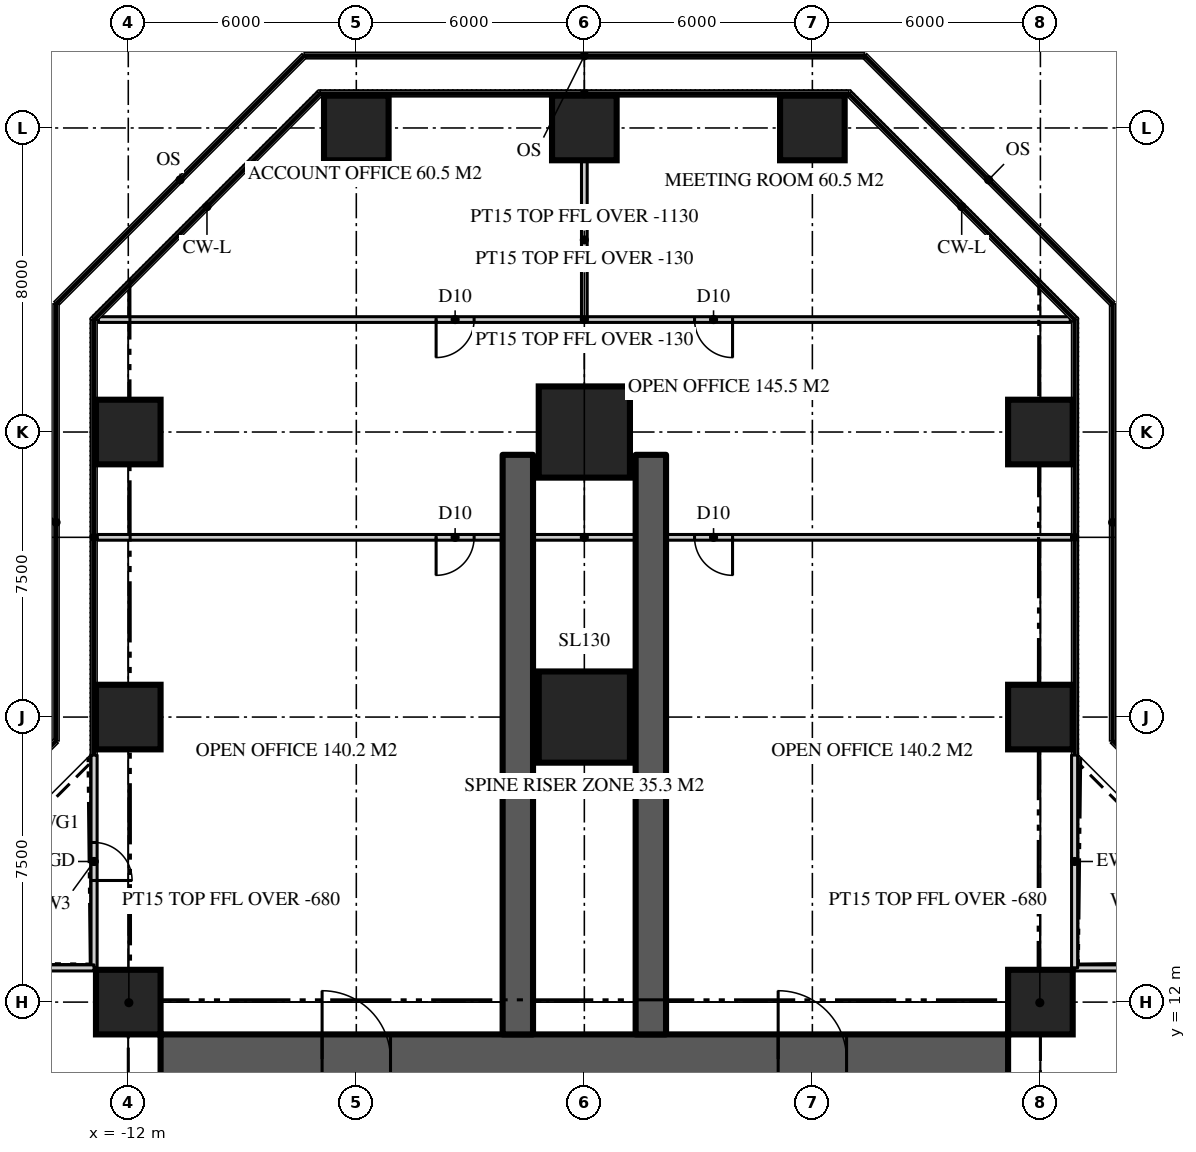
"""IFC4 building model, lengths in metres.
Left out: names, types, materials, properties, quantities, classifications, styles, units other than length and angle.
Written with IfcOpenShell. Run it as: python <this file> out.ifc"""

import sys

from ifc_helpers import new_model, si_unit, direction, frame, frame_2d, origin, origin_2d, place, context, subcontext, project, spatial, rectangle, extrude, element, fill, save


model = new_model("IFC4")
c1 = context("Model", 3, precision=1e-05, world=origin(), true_north=direction((0.0, 1.0)))
c2 = subcontext(c1, "Body", "Model", "MODEL_VIEW")
j1 = project(units=[si_unit("LENGTHUNIT", "METRE"), si_unit("PLANEANGLEUNIT", "RADIAN")], contexts=[c1])
p1 = place(None, origin())
s1 = spatial("IfcSite", under=j1, at=p1, CompositionType="ELEMENT")
p2 = place(p1, origin())
s2 = spatial("IfcBuilding", under=s1, at=p2, CompositionType="ELEMENT")
p3 = place(p2, frame((0.0, 0.0, 94.2)))
s3 = spatial("IfcBuildingStorey", under=s2, at=p3, CompositionType="ELEMENT", Elevation=94.2)
p4 = place(p3, frame((-11.15, 10.5, 0.0), z_axis=(0.0, 0.0, 1.0), x_axis=(1.0, 0.0, 0.0)))
e1 = element("IfcWall", 1, at=p4, inside=s3, PredefinedType="SHEAR", context=c2, shape_type="SweptSolid", body=[
    extrude(rectangle(XDim=22.3, YDim=1.3, at=frame_2d((11.15, 0.0))), origin(), (0.0, 0.0, 1.0), 3.9),
])
p5 = place(p4, frame((4.25, 0.0, 0.0)))
e2 = element("IfcOpeningElement", 2, at=p5, cuts=e1, PredefinedType="OPENING", context=c2, shape_type="SweptSolid", body=[
    extrude(rectangle(XDim=1.8, YDim=2.2, at=frame_2d((0.9, 1.1))), frame((0.0, 0.66, 0.0), z_axis=(0.0, -1.0, 0.0), x_axis=(1.0, 0.0, 0.0)), (0.0, 0.0, 1.0), 1.32),
])
p6 = place(p4, frame((16.25, 0.0, 0.0)))
e3 = element("IfcOpeningElement", 3, at=p6, cuts=e1, PredefinedType="OPENING", context=c2, shape_type="SweptSolid", body=[
    extrude(rectangle(XDim=1.8, YDim=2.2, at=frame_2d((0.9, 1.1))), frame((0.0, 0.66, 0.0), z_axis=(0.0, -1.0, 0.0), x_axis=(1.0, 0.0, 0.0)), (0.0, 0.0, 1.0), 1.32),
])
for number, where, z_axis, x_axis in (
    (4, (1.75, 11.15, 0.0), (0.0, 0.0, 1.0), (0.0, 1.0, 0.0)),
    (5, (-1.75, 11.15, 0.0), (0.0, 0.0, 1.0), (0.0, 1.0, 0.0)),
):
    element("IfcWall", number, at=place(p3, frame(where, z_axis=z_axis, x_axis=x_axis)), inside=s3, PredefinedType="SHEAR", context=c2, shape_type="SweptSolid", body=[
        extrude(rectangle(XDim=15.25, YDim=0.8, at=frame_2d((7.625, 0.0))), origin(), (0.0, 0.0, 1.0), 3.9),
    ])
for number, where, z_axis, x_axis in (
    (6, (-12.0, 12.0, 0.0), (0.0, 0.0, 1.0), (1.0, 0.0, 0.0)),
    (7, (12.0, 12.0, 0.0), (0.0, 0.0, 1.0), (1.0, 0.0, 0.0)),
    (8, (-12.0, 19.5, 0.0), (0.0, 0.0, 1.0), (1.0, 0.0, 0.0)),
):
    element("IfcColumn", number, at=place(p3, frame(where, z_axis=z_axis, x_axis=x_axis)), inside=s3, PredefinedType="COLUMN", context=c2, shape_type="SweptSolid", body=[
        extrude(rectangle(XDim=1.7, YDim=1.7, at=origin_2d()), origin(), (0.0, 0.0, 1.0), 3.9),
    ])
p7 = place(p3, frame((0.0, 19.5, 0.0), z_axis=(0.0, 0.0, 1.0), x_axis=(1.0, 0.0, 0.0)))
e9 = element("IfcColumn", 9, at=p7, inside=s3, PredefinedType="COLUMN", context=c2, shape_type="SweptSolid", body=[
    extrude(rectangle(XDim=2.4, YDim=2.4, at=origin_2d()), origin(), (0.0, 0.0, 1.0), 3.9),
])
for number, where, z_axis, x_axis in (
    (10, (12.0, 19.5, 0.0), (0.0, 0.0, 1.0), (1.0, 0.0, 0.0)),
    (11, (-12.0, 27.0, 0.0), (0.0, 0.0, 1.0), (1.0, 0.0, 0.0)),
):
    element("IfcColumn", number, at=place(p3, frame(where, z_axis=z_axis, x_axis=x_axis)), inside=s3, PredefinedType="COLUMN", context=c2, shape_type="SweptSolid", body=[
        extrude(rectangle(XDim=1.7, YDim=1.7, at=origin_2d()), origin(), (0.0, 0.0, 1.0), 3.9),
    ])
p8 = place(p3, frame((0.0, 27.0, 0.0), z_axis=(0.0, 0.0, 1.0), x_axis=(1.0, 0.0, 0.0)))
e12 = element("IfcColumn", 12, at=p8, inside=s3, PredefinedType="COLUMN", context=c2, shape_type="SweptSolid", body=[
    extrude(rectangle(XDim=2.4, YDim=2.4, at=origin_2d()), origin(), (0.0, 0.0, 1.0), 3.9),
])
for number, where, z_axis, x_axis in (
    (13, (12.0, 27.0, 0.0), (0.0, 0.0, 1.0), (1.0, 0.0, 0.0)),
    (14, (-6.0, 35.0, 0.0), (0.0, 0.0, 1.0), (1.0, 0.0, 0.0)),
    (15, (0.0, 35.0, 0.0), (0.0, 0.0, 1.0), (1.0, 0.0, 0.0)),
    (16, (6.0, 35.0, 0.0), (0.0, 0.0, 1.0), (1.0, 0.0, 0.0)),
):
    element("IfcColumn", number, at=place(p3, frame(where, z_axis=z_axis, x_axis=x_axis)), inside=s3, PredefinedType="COLUMN", context=c2, shape_type="SweptSolid", body=[
        extrude(rectangle(XDim=1.7, YDim=1.7, at=origin_2d()), origin(), (0.0, 0.0, 1.0), 3.9),
    ])
p9 = place(p3, frame((18.5, 12.9, 0.0), z_axis=(0.0, 0.0, 1.0), x_axis=(-1.0, 0.0, 0.0)))
e17 = element("IfcWall", 17, at=p9, inside=s3, PredefinedType="SOLIDWALL", context=c2, shape_type="SweptSolid", body=[
    extrude(rectangle(XDim=5.6, YDim=0.16, at=frame_2d((2.8, 0.0))), origin(), (0.0, 0.0, 1.0), 3.77),
])
p10 = place(p9, frame((2.3, 0.0, 0.0)))
e18 = element("IfcOpeningElement", 18, at=p10, cuts=e17, PredefinedType="OPENING", context=c2, shape_type="SweptSolid", body=[
    extrude(rectangle(XDim=1.0, YDim=2.2, at=frame_2d((0.5, 1.1))), frame((0.0, 0.09, 0.0), z_axis=(0.0, -1.0, 0.0), x_axis=(1.0, 0.0, 0.0)), (0.0, 0.0, 1.0), 0.18),
])
p11 = place(p3, frame((12.9, 12.9, 0.0), z_axis=(0.0, 0.0, 1.0), x_axis=(0.0, 1.0, 0.0)))
e19 = element("IfcWall", 19, at=p11, inside=s3, PredefinedType="SOLIDWALL", context=c2, shape_type="SweptSolid", body=[
    extrude(rectangle(XDim=5.6, YDim=0.16, at=frame_2d((2.8, 0.0))), origin(), (0.0, 0.0, 1.0), 3.77),
])
p12 = place(p3, frame((-12.9, 18.5, 0.0), z_axis=(0.0, 0.0, 1.0), x_axis=(0.0, -1.0, 0.0)))
e20 = element("IfcWall", 20, at=p12, inside=s3, PredefinedType="SOLIDWALL", context=c2, shape_type="SweptSolid", body=[
    extrude(rectangle(XDim=5.6, YDim=0.16, at=frame_2d((2.8, 0.0))), origin(), (0.0, 0.0, 1.0), 3.77),
])
p13 = place(p12, frame((2.3, 0.0, 0.0)))
e21 = element("IfcOpeningElement", 21, at=p13, cuts=e20, PredefinedType="OPENING", context=c2, shape_type="SweptSolid", body=[
    extrude(rectangle(XDim=1.0, YDim=2.2, at=frame_2d((0.5, 1.1))), frame((0.0, 0.09, 0.0), z_axis=(0.0, -1.0, 0.0), x_axis=(1.0, 0.0, 0.0)), (0.0, 0.0, 1.0), 0.18),
])
p14 = place(p3, frame((-12.9, 12.9, 0.0), z_axis=(0.0, 0.0, 1.0), x_axis=(-1.0, 0.0, 0.0)))
e22 = element("IfcWall", 22, at=p14, inside=s3, PredefinedType="SOLIDWALL", context=c2, shape_type="SweptSolid", body=[
    extrude(rectangle(XDim=5.6, YDim=0.16, at=frame_2d((2.8, 0.0))), origin(), (0.0, 0.0, 1.0), 3.77),
])
p15 = place(p3, frame((12.82, 24.229, 0.0), z_axis=(0.0, 0.0, 1.0), x_axis=(-1.0, 0.0, 0.0)))
e23 = element("IfcWall", 23, at=p15, inside=s3, PredefinedType="PARTITIONING", context=c2, shape_type="SweptSolid", body=[
    extrude(rectangle(XDim=25.64, YDim=0.15, at=frame_2d((12.82, 0.0))), origin(), (0.0, 0.0, 1.0), 3.77),
])
p16 = place(p15, frame((15.72, 0.0, 0.0)))
e24 = element("IfcOpeningElement", 24, at=p16, cuts=e23, PredefinedType="OPENING", context=c2, shape_type="SweptSolid", body=[
    extrude(rectangle(XDim=1.0, YDim=2.2, at=frame_2d((0.5, 1.1))), frame((0.0, 0.085, 0.0), z_axis=(0.0, -1.0, 0.0), x_axis=(1.0, 0.0, 0.0)), (0.0, 0.0, 1.0), 0.17),
])
p17 = place(p15, frame((8.92, 0.0, 0.0)))
e25 = element("IfcOpeningElement", 25, at=p17, cuts=e23, PredefinedType="OPENING", context=c2, shape_type="SweptSolid", body=[
    extrude(rectangle(XDim=1.0, YDim=2.2, at=frame_2d((0.5, 1.1))), frame((0.0, 0.085, 0.0), z_axis=(0.0, -1.0, 0.0), x_axis=(1.0, 0.0, 0.0)), (0.0, 0.0, 1.0), 0.17),
])
p18 = place(p3, frame((12.786, 29.959, 0.0), z_axis=(0.0, 0.0, 1.0), x_axis=(-1.0, 0.0, 0.0)))
e26 = element("IfcWall", 26, at=p18, inside=s3, PredefinedType="PARTITIONING", context=c2, shape_type="SweptSolid", body=[
    extrude(rectangle(XDim=25.573, YDim=0.15, at=frame_2d((12.786, 0.0))), origin(), (0.0, 0.0, 1.0), 3.77),
])
p19 = place(p18, frame((15.687, 0.0, 0.0)))
e27 = element("IfcOpeningElement", 27, at=p19, cuts=e26, PredefinedType="OPENING", context=c2, shape_type="SweptSolid", body=[
    extrude(rectangle(XDim=1.0, YDim=2.2, at=frame_2d((0.5, 1.1))), frame((0.0, 0.085, 0.0), z_axis=(0.0, -1.0, 0.0), x_axis=(1.0, 0.0, 0.0)), (0.0, 0.0, 1.0), 0.17),
])
p20 = place(p18, frame((8.886, 0.0, 0.0)))
e28 = element("IfcOpeningElement", 28, at=p20, cuts=e26, PredefinedType="OPENING", context=c2, shape_type="SweptSolid", body=[
    extrude(rectangle(XDim=1.0, YDim=2.2, at=frame_2d((0.5, 1.1))), frame((0.0, 0.085, 0.0), z_axis=(0.0, -1.0, 0.0), x_axis=(1.0, 0.0, 0.0)), (0.0, 0.0, 1.0), 0.17),
])
p21 = place(p3, frame((0.0, 29.959, 0.0), z_axis=(0.0, 0.0, 1.0), x_axis=(0.0, 1.0, 0.0)))
e29 = element("IfcWall", 29, at=p21, inside=s3, PredefinedType="PARTITIONING", context=c2, shape_type="SweptSolid", body=[
    extrude(rectangle(XDim=4.191, YDim=0.15, at=frame_2d((2.095, 0.0))), origin(), (0.0, 0.0, 1.0), 2.77),
])
for number, where, z_axis, x_axis in (
    (30, (11.15, 11.15, 0.0), (0.0, 0.0, 1.0), (0.707, 0.707, 0.0)),
    (31, (-11.15, 11.15, 0.0), (0.0, 0.0, 1.0), (-0.707, 0.707, 0.0)),
):
    element("IfcWall", number, at=place(p3, frame(where, z_axis=z_axis, x_axis=x_axis)), inside=s3, PredefinedType="PARTITIONING", context=c2, shape_type="SweptSolid", body=[
        extrude(rectangle(XDim=2.362, YDim=0.15, at=frame_2d((1.181, 0.0))), origin(), (0.0, 0.0, 1.0), 3.22),
    ])
p22 = place(p13, origin())
e32 = element("IfcDoor", 32, at=p22, inside=s3, OperationType="SINGLE_SWING_RIGHT", PredefinedType="DOOR", context=c2, shape_type="SweptSolid", body=[
    extrude(rectangle(XDim=1.0, YDim=2.2, at=frame_2d((0.5, 1.1))), frame((0.0, 0.025, 0.0), z_axis=(0.0, -1.0, 0.0), x_axis=(1.0, 0.0, 0.0)), (0.0, 0.0, 1.0), 0.05),
])
fill(e21, e32)
p23 = place(p5, origin())
e33 = element("IfcDoor", 33, at=p23, inside=s3, OperationType="DOUBLE_DOOR_DOUBLE_SWING", PredefinedType="DOOR", context=c2, shape_type="SweptSolid", body=[
    extrude(rectangle(XDim=1.8, YDim=2.2, at=frame_2d((0.9, 1.1))), frame((0.0, 0.025, 0.0), z_axis=(0.0, -1.0, 0.0), x_axis=(1.0, 0.0, 0.0)), (0.0, 0.0, 1.0), 0.05),
])
fill(e2, e33)
p24 = place(p6, origin())
e34 = element("IfcDoor", 34, at=p24, inside=s3, OperationType="DOUBLE_DOOR_DOUBLE_SWING", PredefinedType="DOOR", context=c2, shape_type="SweptSolid", body=[
    extrude(rectangle(XDim=1.8, YDim=2.2, at=frame_2d((0.9, 1.1))), frame((0.0, 0.025, 0.0), z_axis=(0.0, -1.0, 0.0), x_axis=(1.0, 0.0, 0.0)), (0.0, 0.0, 1.0), 0.05),
])
fill(e3, e34)
p25 = place(p16, origin())
e35 = element("IfcDoor", 35, at=p25, inside=s3, OperationType="SINGLE_SWING_RIGHT", PredefinedType="DOOR", context=c2, shape_type="SweptSolid", body=[
    extrude(rectangle(XDim=1.0, YDim=2.2, at=frame_2d((0.5, 1.1))), frame((0.0, 0.025, 0.0), z_axis=(0.0, -1.0, 0.0), x_axis=(1.0, 0.0, 0.0)), (0.0, 0.0, 1.0), 0.05),
])
fill(e24, e35)
p26 = place(p17, origin())
e36 = element("IfcDoor", 36, at=p26, inside=s3, OperationType="SINGLE_SWING_LEFT", PredefinedType="DOOR", context=c2, shape_type="SweptSolid", body=[
    extrude(rectangle(XDim=1.0, YDim=2.2, at=frame_2d((0.5, 1.1))), frame((0.0, 0.025, 0.0), z_axis=(0.0, -1.0, 0.0), x_axis=(1.0, 0.0, 0.0)), (0.0, 0.0, 1.0), 0.05),
])
fill(e25, e36)
p27 = place(p19, origin())
e37 = element("IfcDoor", 37, at=p27, inside=s3, OperationType="SINGLE_SWING_RIGHT", PredefinedType="DOOR", context=c2, shape_type="SweptSolid", body=[
    extrude(rectangle(XDim=1.0, YDim=2.2, at=frame_2d((0.5, 1.1))), frame((0.0, 0.025, 0.0), z_axis=(0.0, -1.0, 0.0), x_axis=(1.0, 0.0, 0.0)), (0.0, 0.0, 1.0), 0.05),
])
fill(e27, e37)
p28 = place(p20, origin())
e38 = element("IfcDoor", 38, at=p28, inside=s3, OperationType="SINGLE_SWING_LEFT", PredefinedType="DOOR", context=c2, shape_type="SweptSolid", body=[
    extrude(rectangle(XDim=1.0, YDim=2.2, at=frame_2d((0.5, 1.1))), frame((0.0, 0.025, 0.0), z_axis=(0.0, -1.0, 0.0), x_axis=(1.0, 0.0, 0.0)), (0.0, 0.0, 1.0), 0.05),
])
fill(e28, e38)
save(model, sys.argv[1])
